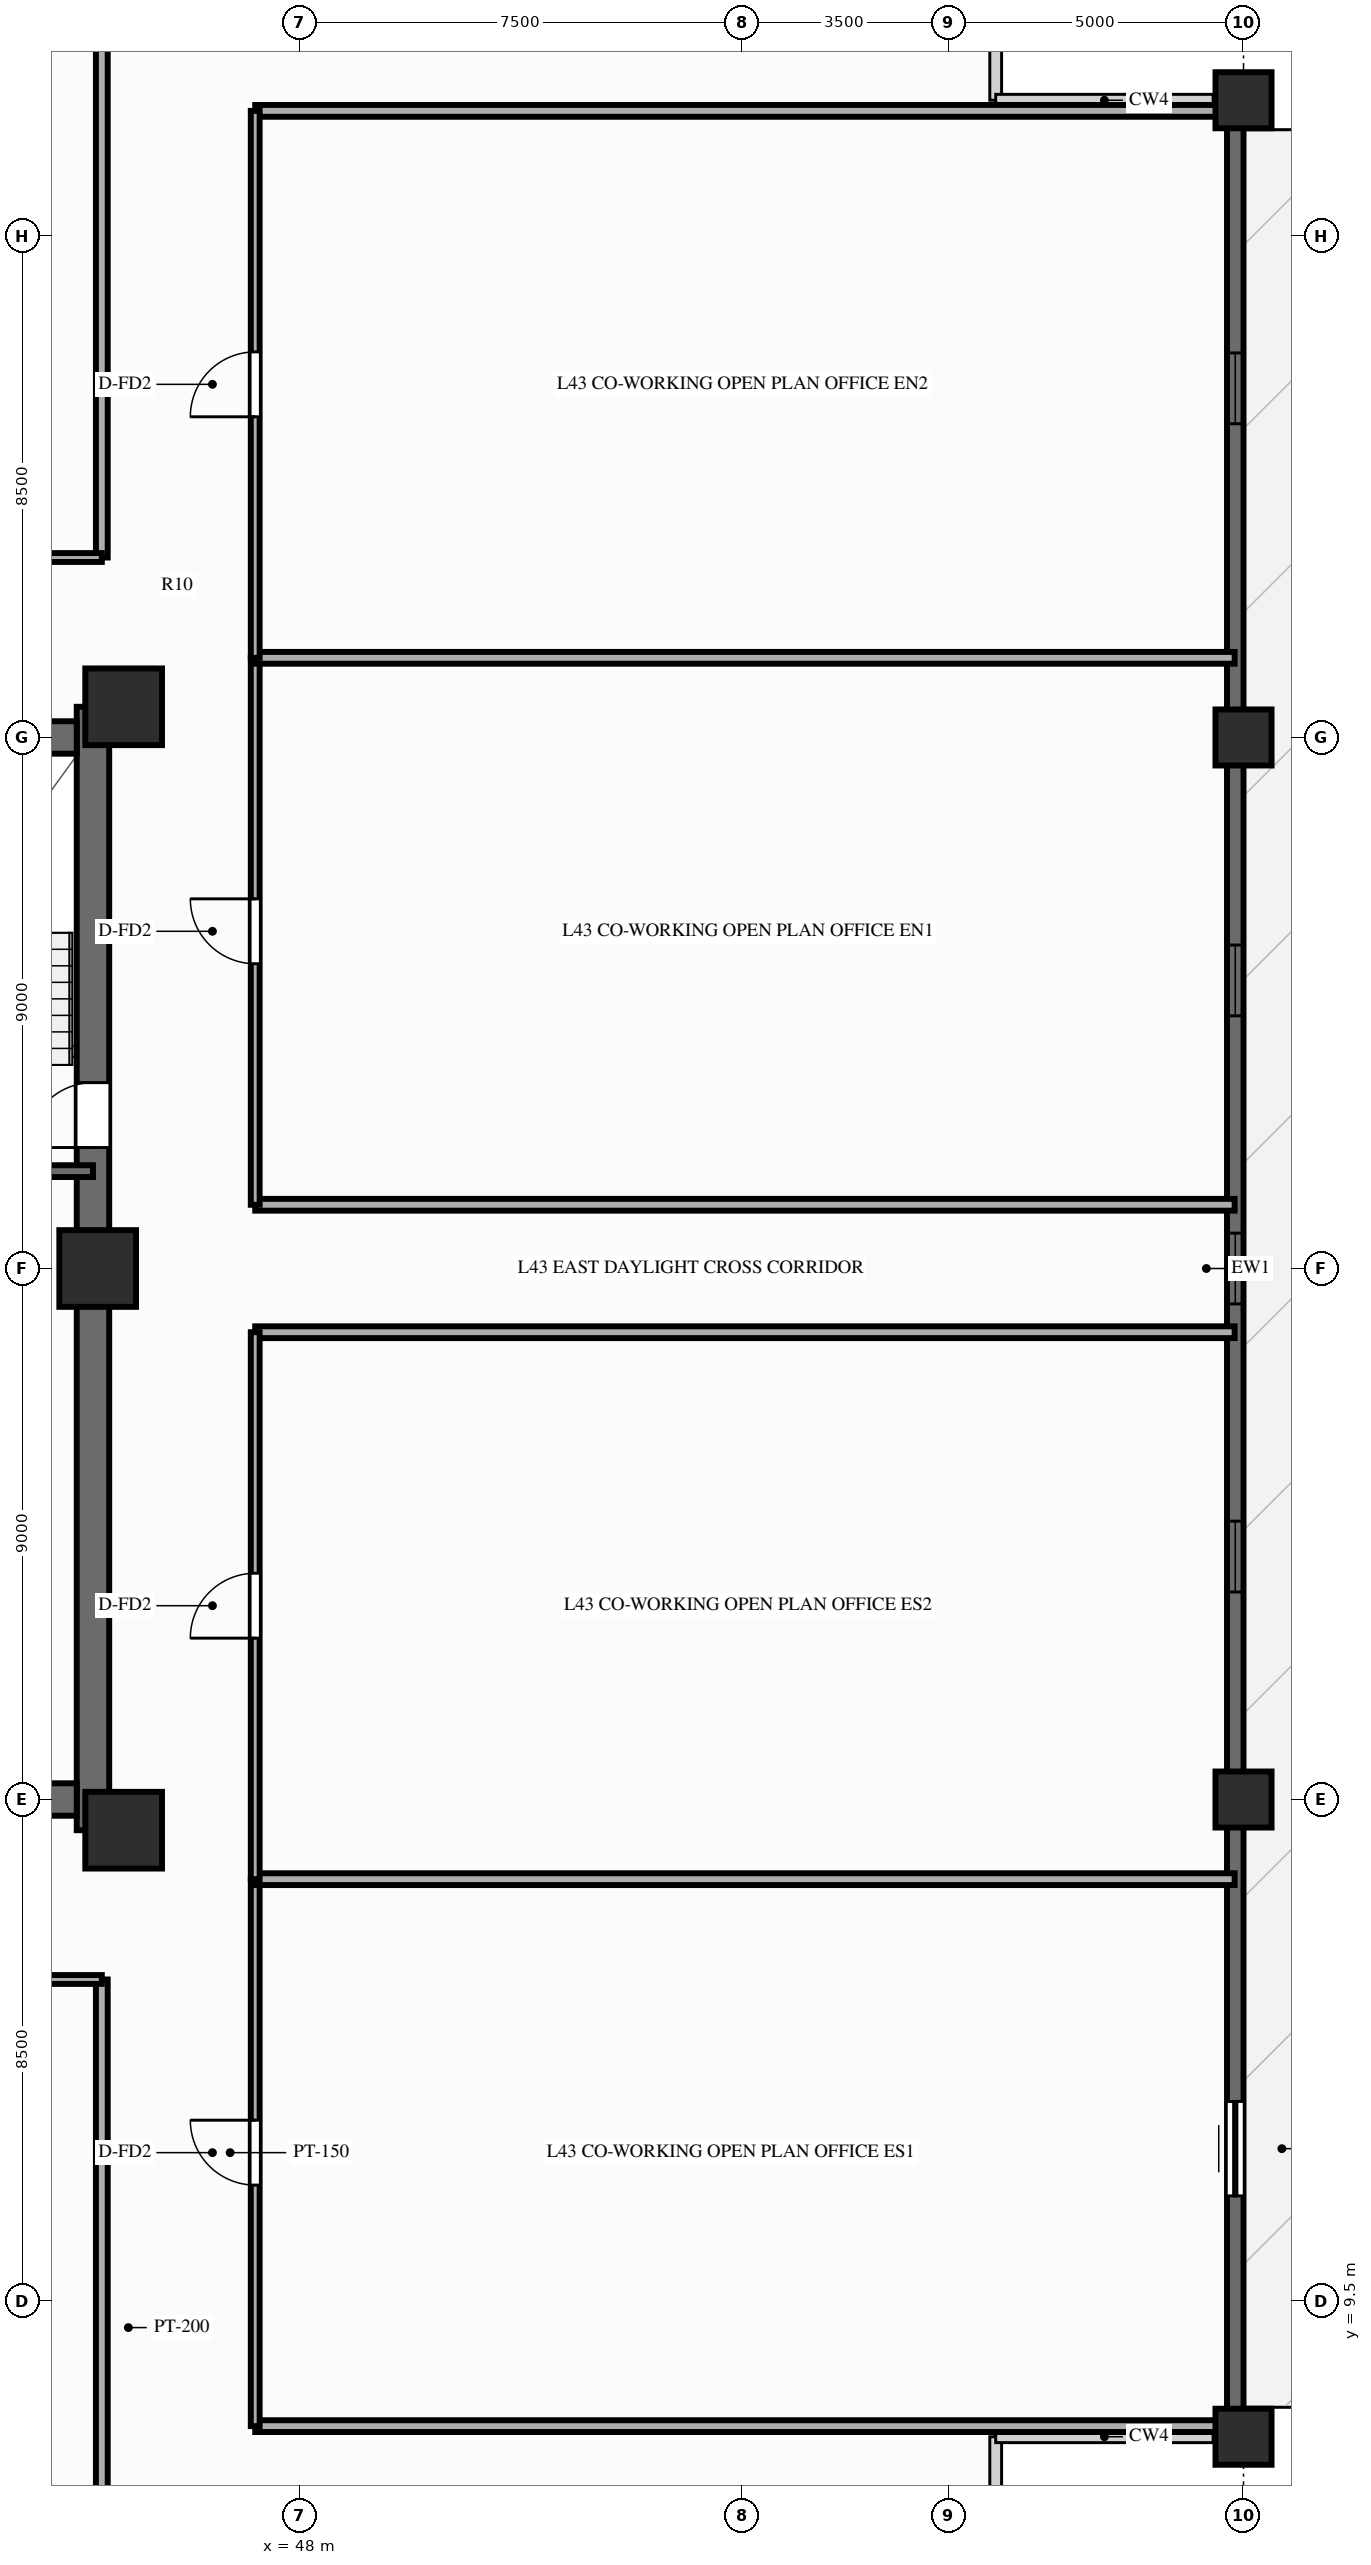
"""IFC4 building model, lengths in metres.
Left out: names, types, materials, properties, quantities, classifications, styles, units other than length and angle.
Written with IfcOpenShell. Run it as: python <this file> out.ifc"""

import sys

from ifc_helpers import new_model, si_unit, direction, frame, frame_2d, origin, origin_2d, place, context, subcontext, project, spatial, rectangle, extrude, source, transform, mapped, element, fill, save


model = new_model("IFC4")
c1 = context("Model", 3, precision=1e-05, world=origin(), true_north=direction((0.0, 1.0)))
c2 = subcontext(c1, "Body", "Model", "MODEL_VIEW")
j1 = project(units=[si_unit("LENGTHUNIT", "METRE"), si_unit("PLANEANGLEUNIT", "RADIAN")], contexts=[c1])
p1 = place(None, origin())
s1 = spatial("IfcSite", under=j1, at=p1, CompositionType="ELEMENT")
p2 = place(p1, origin())
s2 = spatial("IfcBuilding", under=s1, at=p2, CompositionType="ELEMENT")
p3 = place(p2, frame((0.0, 0.0, 135.75)))
s3 = spatial("IfcBuildingStorey", under=s2, at=p3, CompositionType="ELEMENT", Elevation=135.75)
p4 = place(p3, frame((44.5, 17.48, 0.0), z_axis=(0.0, 0.0, 1.0), x_axis=(0.0, 1.0, 0.0)))
e1 = element("IfcWall", 1, at=p4, inside=s3, PredefinedType="SHEAR", context=c2, shape_type="SweptSolid", body=[
    extrude(rectangle(XDim=19.04, YDim=0.55, at=frame_2d((9.52, 0.0))), origin(), (0.0, 0.0, 1.0), 3.0),
])
p5 = place(p4, frame((12.67, 0.0, 0.0), z_axis=(0.0, 0.0, 1.0), x_axis=(-1.0, 0.0, 0.0)))
e2 = element("IfcOpeningElement", 2, at=p5, cuts=e1, PredefinedType="OPENING", context=c2, shape_type="SweptSolid", body=[
    extrude(rectangle(XDim=1.1, YDim=2.15, at=frame_2d((0.55, 1.075))), frame((0.0, 0.287, 0.0), z_axis=(0.0, -1.0, 0.0), x_axis=(1.0, 0.0, 0.0)), (0.0, 0.0, 1.0), 0.574),
])
p6 = place(p3, frame((31.775, 18.0, 0.0), z_axis=(0.0, 0.0, 1.0), x_axis=(1.0, 0.0, 0.0)))
e3 = element("IfcWall", 3, at=p6, inside=s3, PredefinedType="SHEAR", context=c2, shape_type="SweptSolid", body=[
    extrude(rectangle(XDim=12.45, YDim=0.55, at=frame_2d((6.225, 0.0))), origin(), (0.0, 0.0, 1.0), 3.0),
])
p7 = place(p3, frame((31.775, 36.0, 0.0), z_axis=(0.0, 0.0, 1.0), x_axis=(1.0, 0.0, 0.0)))
e4 = element("IfcWall", 4, at=p7, inside=s3, PredefinedType="SHEAR", context=c2, shape_type="SweptSolid", body=[
    extrude(rectangle(XDim=12.45, YDim=0.55, at=frame_2d((6.225, 0.0))), origin(), (0.0, 0.0, 1.0), 3.0),
])
p8 = place(p7, frame((5.175, 0.0, 0.0), z_axis=(0.0, 0.0, 1.0), x_axis=(-1.0, 0.0, 0.0)))
e5 = element("IfcOpeningElement", 5, at=p8, cuts=e4, PredefinedType="OPENING", context=c2, shape_type="SweptSolid", body=[
    extrude(rectangle(XDim=1.4, YDim=2.15, at=frame_2d((0.7, 1.075))), frame((0.0, 0.287, 0.0), z_axis=(0.0, -1.0, 0.0), x_axis=(1.0, 0.0, 0.0)), (0.0, 0.0, 1.0), 0.574),
])
m1 = source(origin(), c2, "Body", "SweptSolid", [
    extrude(rectangle(XDim=1.3, YDim=1.3, at=origin_2d()), origin(), (0.0, 0.0, 1.0), 3.0),
])
for number, where, z_axis, x_axis in (
    (6, (45.02, 17.48, 0.0), (0.0, 0.0, 1.0), (1.0, 0.0, 0.0)),
    (7, (45.02, 36.52, 0.0), (0.0, 0.0, 1.0), (1.0, 0.0, 0.0)),
    (8, (44.58, 27.0, 0.0), (0.0, 0.0, 1.0), (1.0, 0.0, 0.0)),
):
    element("IfcColumn", number, at=place(p3, frame(where, z_axis=z_axis, x_axis=x_axis)), inside=s3, PredefinedType="COLUMN", context=c2, shape_type="MappedRepresentation", body=[
        mapped(m1, transform((0.0, 0.0, 0.0), scale=1.0)),
    ])
m2 = source(origin(), c2, "Body", "SweptSolid", [
    extrude(rectangle(XDim=0.95, YDim=0.95, at=origin_2d()), origin(), (0.0, 0.0, 1.0), 3.0),
])
for number, where, z_axis, x_axis in (
    (9, (64.0, 7.2, 0.0), (0.0, 0.0, 1.0), (1.0, 0.0, 0.0)),
    (10, (64.0, 18.0, 0.0), (0.0, 0.0, 1.0), (1.0, 0.0, 0.0)),
    (11, (64.0, 36.0, 0.0), (0.0, 0.0, 1.0), (1.0, 0.0, 0.0)),
    (12, (64.0, 46.8, 0.0), (0.0, 0.0, 1.0), (1.0, 0.0, 0.0)),
):
    element("IfcColumn", number, at=place(p3, frame(where, z_axis=z_axis, x_axis=x_axis)), inside=s3, PredefinedType="COLUMN", context=c2, shape_type="MappedRepresentation", body=[
        mapped(m2, transform((0.0, 0.0, 0.0), scale=1.0)),
    ])
p9 = place(p3, frame((63.86, 7.2, 0.0), z_axis=(0.0, 0.0, 1.0), x_axis=(0.0, 1.0, 0.0)))
e13 = element("IfcWall", 13, at=p9, inside=s3, PredefinedType="SOLIDWALL", context=c2, shape_type="SweptSolid", body=[
    extrude(rectangle(XDim=39.6, YDim=0.28, at=frame_2d((19.8, 0.0))), origin(), (0.0, 0.0, 1.0), 2.28),
])
p10 = place(p9, frame((5.683, 0.0, 0.0), z_axis=(0.0, 0.0, 1.0), x_axis=(-1.0, 0.0, 0.0)))
e14 = element("IfcOpeningElement", 14, at=p10, cuts=e13, PredefinedType="OPENING", context=c2, shape_type="SweptSolid", body=[
    extrude(rectangle(XDim=1.6, YDim=2.15, at=frame_2d((0.8, 1.075))), frame((0.0, 0.152, 0.0), z_axis=(0.0, -1.0, 0.0), x_axis=(1.0, 0.0, 0.0)), (0.0, 0.0, 1.0), 0.304),
])
p11 = place(p9, frame((14.317, 0.0, 0.25)))
e15 = element("IfcOpeningElement", 15, at=p11, cuts=e13, PredefinedType="OPENING", context=c2, shape_type="SweptSolid", body=[
    extrude(rectangle(XDim=1.2, YDim=1.5, at=frame_2d((0.6, 0.75))), frame((0.0, 0.152, 0.0), z_axis=(0.0, -1.0, 0.0), x_axis=(1.0, 0.0, 0.0)), (0.0, 0.0, 1.0), 0.304),
])
p12 = place(p9, frame((19.2, 0.0, 0.25)))
e16 = element("IfcOpeningElement", 16, at=p12, cuts=e13, PredefinedType="OPENING", context=c2, shape_type="SweptSolid", body=[
    extrude(rectangle(XDim=1.2, YDim=1.5, at=frame_2d((0.6, 0.75))), frame((0.0, 0.152, 0.0), z_axis=(0.0, -1.0, 0.0), x_axis=(1.0, 0.0, 0.0)), (0.0, 0.0, 1.0), 0.304),
])
p13 = place(p9, frame((24.083, 0.0, 0.25)))
e17 = element("IfcOpeningElement", 17, at=p13, cuts=e13, PredefinedType="OPENING", context=c2, shape_type="SweptSolid", body=[
    extrude(rectangle(XDim=1.2, YDim=1.5, at=frame_2d((0.6, 0.75))), frame((0.0, 0.152, 0.0), z_axis=(0.0, -1.0, 0.0), x_axis=(1.0, 0.0, 0.0)), (0.0, 0.0, 1.0), 0.304),
])
p14 = place(p9, frame((34.117, 0.0, 0.25)))
e18 = element("IfcOpeningElement", 18, at=p14, cuts=e13, PredefinedType="OPENING", context=c2, shape_type="SweptSolid", body=[
    extrude(rectangle(XDim=1.2, YDim=1.5, at=frame_2d((0.6, 0.75))), frame((0.0, 0.152, 0.0), z_axis=(0.0, -1.0, 0.0), x_axis=(1.0, 0.0, 0.0)), (0.0, 0.0, 1.0), 0.304),
])
p15 = place(p3, frame((40.57, 28.65, 0.0), z_axis=(0.0, 0.0, 1.0), x_axis=(1.0, 0.0, 0.0)))
e19 = element("IfcWall", 19, at=p15, inside=s3, PredefinedType="SOLIDWALL", context=c2, shape_type="SweptSolid", body=[
    extrude(rectangle(XDim=3.93, YDim=0.2, at=frame_2d((1.965, 0.0))), origin(), (0.0, 0.0, 1.0), 2.79),
])
p16 = place(p3, frame((44.65, 14.95, 0.0), z_axis=(0.0, 0.0, 1.0), x_axis=(0.0, -1.0, 0.0)))
e20 = element("IfcWall", 20, at=p16, inside=s3, PredefinedType="PARTITIONING", context=c2, shape_type="SweptSolid", body=[
    extrude(rectangle(XDim=11.8, YDim=0.2, at=frame_2d((5.9, 0.0))), origin(), (0.0, 0.0, 1.0), 2.34),
])
p17 = place(p3, frame((36.25, 14.95, 0.0), z_axis=(0.0, 0.0, 1.0), x_axis=(1.0, 0.0, 0.0)))
e21 = element("IfcWall", 21, at=p17, inside=s3, PredefinedType="PARTITIONING", context=c2, shape_type="SweptSolid", body=[
    extrude(rectangle(XDim=8.4, YDim=0.15, at=frame_2d((4.2, 0.0))), origin(), (0.0, 0.0, 1.0), 2.79),
])
p18 = place(p17, frame((3.367, 0.0, 0.0)))
e22 = element("IfcOpeningElement", 22, at=p18, cuts=e21, PredefinedType="OPENING", context=c2, shape_type="SweptSolid", body=[
    extrude(rectangle(XDim=1.1, YDim=2.15, at=frame_2d((0.55, 1.075))), frame((0.0, 0.087, 0.0), z_axis=(0.0, -1.0, 0.0), x_axis=(1.0, 0.0, 0.0)), (0.0, 0.0, 1.0), 0.174),
])
p19 = place(p3, frame((44.65, 39.05, 0.0), z_axis=(0.0, 0.0, 1.0), x_axis=(0.0, 1.0, 0.0)))
e23 = element("IfcWall", 23, at=p19, inside=s3, PredefinedType="PARTITIONING", context=c2, shape_type="SweptSolid", body=[
    extrude(rectangle(XDim=11.8, YDim=0.2, at=frame_2d((5.9, 0.0))), origin(), (0.0, 0.0, 1.0), 2.34),
])
p20 = place(p3, frame((38.629, 39.05, 0.0), z_axis=(0.0, 0.0, 1.0), x_axis=(1.0, 0.0, 0.0)))
e24 = element("IfcWall", 24, at=p20, inside=s3, PredefinedType="PARTITIONING", context=c2, shape_type="SweptSolid", body=[
    extrude(rectangle(XDim=6.021, YDim=0.15, at=frame_2d((3.01, 0.0))), origin(), (0.0, 0.0, 1.0), 2.79),
])
p21 = place(p20, frame((2.46, 0.0, 0.0)))
e25 = element("IfcOpeningElement", 25, at=p21, cuts=e24, PredefinedType="OPENING", context=c2, shape_type="SweptSolid", body=[
    extrude(rectangle(XDim=1.1, YDim=2.15, at=frame_2d((0.55, 1.075))), frame((0.0, 0.087, 0.0), z_axis=(0.0, -1.0, 0.0), x_axis=(1.0, 0.0, 0.0)), (0.0, 0.0, 1.0), 0.174),
])
for number, where, z_axis, x_axis in (
    (26, (47.25, 7.38, 0.0), (0.0, 0.0, 1.0), (1.0, 0.0, 0.0)),
    (27, (47.25, 25.92, 0.0), (0.0, 0.0, 1.0), (1.0, 0.0, 0.0)),
):
    element("IfcWall", number, at=place(p3, frame(where, z_axis=z_axis, x_axis=x_axis)), inside=s3, PredefinedType="PARTITIONING", context=c2, shape_type="SweptSolid", body=[
        extrude(rectangle(XDim=16.6, YDim=0.2, at=frame_2d((8.3, 0.0))), origin(), (0.0, 0.0, 1.0), 2.79),
    ])
p22 = place(p3, frame((47.25, 7.38, 0.0), z_axis=(0.0, 0.0, 1.0), x_axis=(0.0, 1.0, 0.0)))
e28 = element("IfcWall", 28, at=p22, inside=s3, PredefinedType="PARTITIONING", context=c2, shape_type="SweptSolid", body=[
    extrude(rectangle(XDim=9.27, YDim=0.15, at=frame_2d((4.635, 0.0))), origin(), (0.0, 0.0, 1.0), 2.79),
])
p23 = place(p22, frame((4.085, 0.0, 0.0)))
e29 = element("IfcOpeningElement", 29, at=p23, cuts=e28, PredefinedType="OPENING", context=c2, shape_type="SweptSolid", body=[
    extrude(rectangle(XDim=1.1, YDim=2.15, at=frame_2d((0.55, 1.075))), frame((0.0, 0.087, 0.0), z_axis=(0.0, -1.0, 0.0), x_axis=(1.0, 0.0, 0.0)), (0.0, 0.0, 1.0), 0.174),
])
p24 = place(p3, frame((47.25, 16.65, 0.0), z_axis=(0.0, 0.0, 1.0), x_axis=(1.0, 0.0, 0.0)))
e30 = element("IfcWall", 30, at=p24, inside=s3, PredefinedType="PARTITIONING", context=c2, shape_type="SweptSolid", body=[
    extrude(rectangle(XDim=16.6, YDim=0.2, at=frame_2d((8.3, 0.0))), origin(), (0.0, 0.0, 1.0), 2.79),
])
p25 = place(p3, frame((47.25, 16.65, 0.0), z_axis=(0.0, 0.0, 1.0), x_axis=(0.0, 1.0, 0.0)))
e31 = element("IfcWall", 31, at=p25, inside=s3, PredefinedType="PARTITIONING", context=c2, shape_type="SweptSolid", body=[
    extrude(rectangle(XDim=9.27, YDim=0.15, at=frame_2d((4.635, 0.0))), origin(), (0.0, 0.0, 1.0), 2.79),
])
p26 = place(p25, frame((4.085, 0.0, 0.0)))
e32 = element("IfcOpeningElement", 32, at=p26, cuts=e31, PredefinedType="OPENING", context=c2, shape_type="SweptSolid", body=[
    extrude(rectangle(XDim=1.1, YDim=2.15, at=frame_2d((0.55, 1.075))), frame((0.0, 0.087, 0.0), z_axis=(0.0, -1.0, 0.0), x_axis=(1.0, 0.0, 0.0)), (0.0, 0.0, 1.0), 0.174),
])
for number, where, z_axis, x_axis in (
    (33, (47.25, 28.08, 0.0), (0.0, 0.0, 1.0), (1.0, 0.0, 0.0)),
    (34, (47.25, 46.62, 0.0), (0.0, 0.0, 1.0), (1.0, 0.0, 0.0)),
):
    element("IfcWall", number, at=place(p3, frame(where, z_axis=z_axis, x_axis=x_axis)), inside=s3, PredefinedType="PARTITIONING", context=c2, shape_type="SweptSolid", body=[
        extrude(rectangle(XDim=16.6, YDim=0.2, at=frame_2d((8.3, 0.0))), origin(), (0.0, 0.0, 1.0), 2.79),
    ])
p27 = place(p3, frame((47.25, 28.08, 0.0), z_axis=(0.0, 0.0, 1.0), x_axis=(0.0, 1.0, 0.0)))
e35 = element("IfcWall", 35, at=p27, inside=s3, PredefinedType="PARTITIONING", context=c2, shape_type="SweptSolid", body=[
    extrude(rectangle(XDim=9.27, YDim=0.15, at=frame_2d((4.635, 0.0))), origin(), (0.0, 0.0, 1.0), 2.79),
])
p28 = place(p27, frame((4.085, 0.0, 0.0)))
e36 = element("IfcOpeningElement", 36, at=p28, cuts=e35, PredefinedType="OPENING", context=c2, shape_type="SweptSolid", body=[
    extrude(rectangle(XDim=1.1, YDim=2.15, at=frame_2d((0.55, 1.075))), frame((0.0, 0.087, 0.0), z_axis=(0.0, -1.0, 0.0), x_axis=(1.0, 0.0, 0.0)), (0.0, 0.0, 1.0), 0.174),
])
p29 = place(p3, frame((47.25, 37.35, 0.0), z_axis=(0.0, 0.0, 1.0), x_axis=(1.0, 0.0, 0.0)))
e37 = element("IfcWall", 37, at=p29, inside=s3, PredefinedType="PARTITIONING", context=c2, shape_type="SweptSolid", body=[
    extrude(rectangle(XDim=16.6, YDim=0.2, at=frame_2d((8.3, 0.0))), origin(), (0.0, 0.0, 1.0), 2.79),
])
p30 = place(p3, frame((47.25, 37.35, 0.0), z_axis=(0.0, 0.0, 1.0), x_axis=(0.0, 1.0, 0.0)))
e38 = element("IfcWall", 38, at=p30, inside=s3, PredefinedType="PARTITIONING", context=c2, shape_type="SweptSolid", body=[
    extrude(rectangle(XDim=9.27, YDim=0.15, at=frame_2d((4.635, 0.0))), origin(), (0.0, 0.0, 1.0), 2.79),
])
p31 = place(p30, frame((4.085, 0.0, 0.0)))
e39 = element("IfcOpeningElement", 39, at=p31, cuts=e38, PredefinedType="OPENING", context=c2, shape_type="SweptSolid", body=[
    extrude(rectangle(XDim=1.1, YDim=2.15, at=frame_2d((0.55, 1.075))), frame((0.0, 0.087, 0.0), z_axis=(0.0, -1.0, 0.0), x_axis=(1.0, 0.0, 0.0)), (0.0, 0.0, 1.0), 0.174),
])
m3 = source(origin(), c2, "Body", "SweptSolid", [
    extrude(rectangle(XDim=1.6, YDim=2.15, at=frame_2d((0.8, 1.075))), frame((0.0, 0.025, 0.0), z_axis=(0.0, -1.0, 0.0), x_axis=(1.0, 0.0, 0.0)), (0.0, 0.0, 1.0), 0.05),
])
p32 = place(p10, origin())
e40 = element("IfcDoor", 40, at=p32, inside=s3, OperationType="SLIDING_TO_LEFT", PredefinedType="DOOR", context=c2, shape_type="MappedRepresentation", body=[
    mapped(m3, transform((0.0, 0.0, 0.0), scale=1.0)),
])
fill(e14, e40)
m4 = source(origin(), c2, "Body", "SweptSolid", [
    extrude(rectangle(XDim=1.2, YDim=1.5, at=frame_2d((0.6, 0.75))), frame((0.0, 0.03, 0.0), z_axis=(0.0, -1.0, 0.0), x_axis=(1.0, 0.0, 0.0)), (0.0, 0.0, 1.0), 0.06),
])
p33 = place(p11, origin())
e41 = element("IfcWindow", 41, at=p33, inside=s3, PartitioningType="SINGLE_PANEL", PredefinedType="WINDOW", context=c2, shape_type="MappedRepresentation", body=[
    mapped(m4, transform((0.0, 0.0, 0.0), scale=1.0)),
])
fill(e15, e41)
p34 = place(p12, origin())
e42 = element("IfcWindow", 42, at=p34, inside=s3, PartitioningType="SINGLE_PANEL", PredefinedType="WINDOW", context=c2, shape_type="MappedRepresentation", body=[
    mapped(m4, transform((0.0, 0.0, 0.0), scale=1.0)),
])
fill(e16, e42)
p35 = place(p13, origin())
e43 = element("IfcWindow", 43, at=p35, inside=s3, PartitioningType="SINGLE_PANEL", PredefinedType="WINDOW", context=c2, shape_type="MappedRepresentation", body=[
    mapped(m4, transform((0.0, 0.0, 0.0), scale=1.0)),
])
fill(e17, e43)
p36 = place(p14, origin())
e44 = element("IfcWindow", 44, at=p36, inside=s3, PartitioningType="SINGLE_PANEL", PredefinedType="WINDOW", context=c2, shape_type="MappedRepresentation", body=[
    mapped(m4, transform((0.0, 0.0, 0.0), scale=1.0)),
])
fill(e18, e44)
m5 = source(origin(), c2, "Body", "SweptSolid", [
    extrude(rectangle(XDim=1.1, YDim=2.15, at=frame_2d((0.55, 1.075))), frame((0.0, 0.025, 0.0), z_axis=(0.0, -1.0, 0.0), x_axis=(1.0, 0.0, 0.0)), (0.0, 0.0, 1.0), 0.05),
])
p37 = place(p5, origin())
e45 = element("IfcDoor", 45, at=p37, inside=s3, OperationType="SINGLE_SWING_RIGHT", PredefinedType="DOOR", context=c2, shape_type="MappedRepresentation", body=[
    mapped(m5, transform((0.0, 0.0, 0.0), scale=1.0)),
])
fill(e2, e45)
p38 = place(p23, origin())
e46 = element("IfcDoor", 46, at=p38, inside=s3, OperationType="SINGLE_SWING_RIGHT", PredefinedType="DOOR", context=c2, shape_type="MappedRepresentation", body=[
    mapped(m5, transform((0.0, 0.0, 0.0), scale=1.0)),
])
fill(e29, e46)
p39 = place(p26, origin())
e47 = element("IfcDoor", 47, at=p39, inside=s3, OperationType="SINGLE_SWING_LEFT", PredefinedType="DOOR", context=c2, shape_type="MappedRepresentation", body=[
    mapped(m5, transform((0.0, 0.0, 0.0), scale=1.0)),
])
fill(e32, e47)
p40 = place(p28, origin())
e48 = element("IfcDoor", 48, at=p40, inside=s3, OperationType="SINGLE_SWING_RIGHT", PredefinedType="DOOR", context=c2, shape_type="MappedRepresentation", body=[
    mapped(m5, transform((0.0, 0.0, 0.0), scale=1.0)),
])
fill(e36, e48)
p41 = place(p31, origin())
e49 = element("IfcDoor", 49, at=p41, inside=s3, OperationType="SINGLE_SWING_LEFT", PredefinedType="DOOR", context=c2, shape_type="MappedRepresentation", body=[
    mapped(m5, transform((0.0, 0.0, 0.0), scale=1.0)),
])
fill(e39, e49)
save(model, sys.argv[1])
